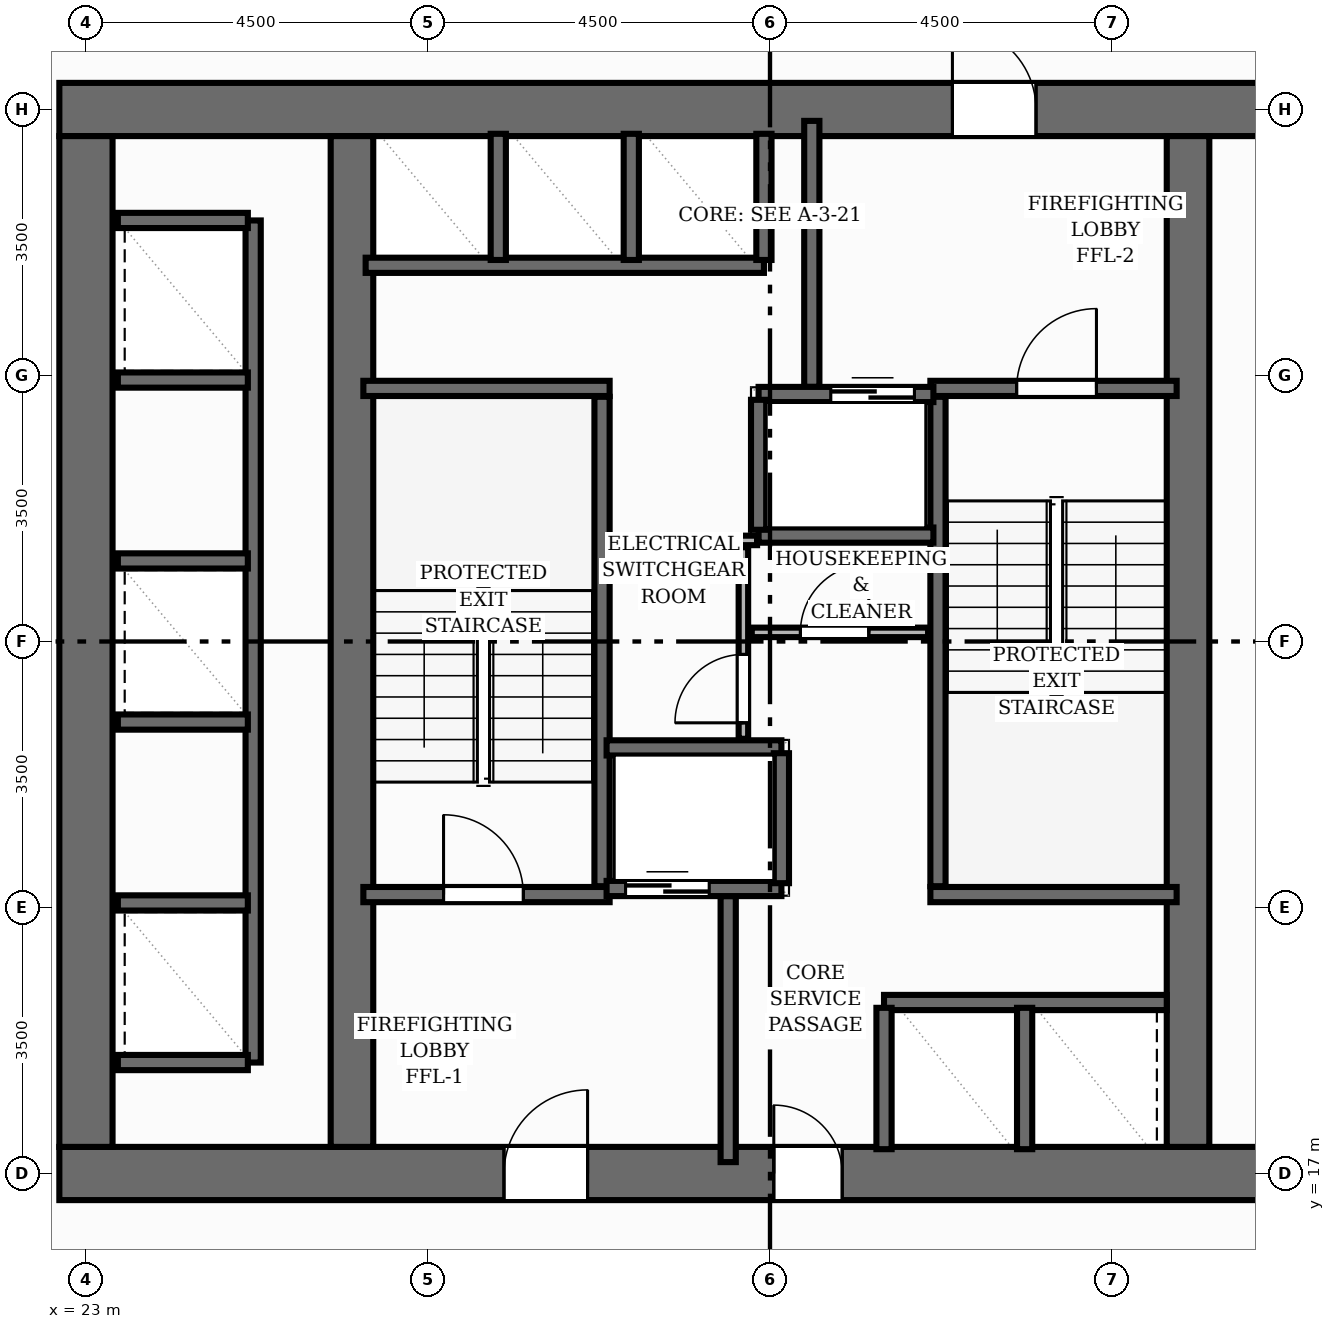
"""IFC4 building model, lengths in metres.
Left out: names, types, materials, properties, quantities, classifications, styles, units other than length and angle.
Written with IfcOpenShell. Run it as: python <this file> out.ifc"""

import sys

from ifc_helpers import new_model, si_unit, direction, frame, frame_2d, origin, place, context, subcontext, project, spatial, rectangle, extrude, element, fill, save


model = new_model("IFC4")
c1 = context("Model", 3, precision=1e-05, world=origin(), true_north=direction((0.0, 1.0)))
c2 = subcontext(c1, "Body", "Model", "MODEL_VIEW")
j1 = project(units=[si_unit("LENGTHUNIT", "METRE"), si_unit("PLANEANGLEUNIT", "RADIAN")], contexts=[c1])
p1 = place(None, origin())
s1 = spatial("IfcSite", under=j1, at=p1, CompositionType="ELEMENT")
p2 = place(p1, origin())
s2 = spatial("IfcBuilding", under=s1, at=p2, CompositionType="ELEMENT")
p3 = place(p2, frame((0.0, 0.0, 80.48)))
s3 = spatial("IfcBuildingStorey", under=s2, at=p3, CompositionType="ELEMENT", Elevation=80.48)
p4 = place(p3, frame((22.65, 17.0, 0.0), z_axis=(0.0, 0.0, 1.0), x_axis=(1.0, 0.0, 0.0)))
e1 = element("IfcWall", 1, at=p4, inside=s3, PredefinedType="SHEAR", context=c2, shape_type="SweptSolid", body=[
    extrude(rectangle(XDim=18.7, YDim=0.7, at=frame_2d((9.35, 0.0))), origin(), (0.0, 0.0, 1.0), 3.2),
])
p5 = place(p4, frame((5.85, 0.0, 0.0)))
e2 = element("IfcOpeningElement", 2, at=p5, cuts=e1, PredefinedType="OPENING", context=c2, shape_type="SweptSolid", body=[
    extrude(rectangle(XDim=1.1, YDim=2.15, at=frame_2d((0.55, 1.075))), frame((0.0, 0.36, 0.0), z_axis=(0.0, -1.0, 0.0), x_axis=(1.0, 0.0, 0.0)), (0.0, 0.0, 1.0), 0.72),
])
p6 = place(p4, frame((9.4, 0.0, 0.0)))
e3 = element("IfcOpeningElement", 3, at=p6, cuts=e1, PredefinedType="OPENING", context=c2, shape_type="SweptSolid", body=[
    extrude(rectangle(XDim=0.9, YDim=2.1, at=frame_2d((0.45, 1.05))), frame((0.0, 0.36, 0.0), z_axis=(0.0, -1.0, 0.0), x_axis=(1.0, 0.0, 0.0)), (0.0, 0.0, 1.0), 0.72),
])
p7 = place(p3, frame((22.65, 31.0, 0.0), z_axis=(0.0, 0.0, 1.0), x_axis=(1.0, 0.0, 0.0)))
e4 = element("IfcWall", 4, at=p7, inside=s3, PredefinedType="SHEAR", context=c2, shape_type="SweptSolid", body=[
    extrude(rectangle(XDim=18.7, YDim=0.7, at=frame_2d((9.35, 0.0))), origin(), (0.0, 0.0, 1.0), 3.2),
])
p8 = place(p7, frame((11.75, 0.0, 0.0)))
e5 = element("IfcOpeningElement", 5, at=p8, cuts=e4, PredefinedType="OPENING", context=c2, shape_type="SweptSolid", body=[
    extrude(rectangle(XDim=1.1, YDim=2.15, at=frame_2d((0.55, 1.075))), frame((0.0, 0.36, 0.0), z_axis=(0.0, -1.0, 0.0), x_axis=(1.0, 0.0, 0.0)), (0.0, 0.0, 1.0), 0.72),
])
p9 = place(p3, frame((23.0, 17.35, 0.0), z_axis=(0.0, 0.0, 1.0), x_axis=(0.0, 1.0, 0.0)))
e6 = element("IfcWall", 6, at=p9, inside=s3, PredefinedType="SHEAR", context=c2, shape_type="SweptSolid", body=[
    extrude(rectangle(XDim=13.3, YDim=0.7, at=frame_2d((6.65, 0.0))), origin(), (0.0, 0.0, 1.0), 3.2),
])
for number, where, z_axis, x_axis in (
    (7, (26.5, 17.35, 0.0), (0.0, 0.0, 1.0), (0.0, 1.0, 0.0)),
    (8, (37.5, 17.35, 0.0), (0.0, 0.0, 1.0), (0.0, 1.0, 0.0)),
):
    element("IfcWall", number, at=place(p3, frame(where, z_axis=z_axis, x_axis=x_axis)), inside=s3, PredefinedType="SHEAR", context=c2, shape_type="SweptSolid", body=[
        extrude(rectangle(XDim=13.3, YDim=0.56, at=frame_2d((6.65, 0.0))), origin(), (0.0, 0.0, 1.0), 3.2),
    ])
p10 = place(p3, frame((29.79, 20.78, 0.0), z_axis=(0.0, 0.0, 1.0), x_axis=(0.0, 1.0, 0.0)))
e9 = element("IfcWall", 9, at=p10, inside=s3, PredefinedType="SHEAR", context=c2, shape_type="SweptSolid", body=[
    extrude(rectangle(XDim=6.44, YDim=0.2, at=frame_2d((3.22, 0.0))), origin(), (0.0, 0.0, 1.0), 3.2),
])
p11 = place(p3, frame((26.65, 27.33, 0.0), z_axis=(0.0, 0.0, 1.0), x_axis=(1.0, 0.0, 0.0)))
e10 = element("IfcWall", 10, at=p11, inside=s3, PredefinedType="SHEAR", context=c2, shape_type="SweptSolid", body=[
    extrude(rectangle(XDim=3.24, YDim=0.2, at=frame_2d((1.62, 0.0))), origin(), (0.0, 0.0, 1.0), 3.2),
])
p12 = place(p3, frame((26.65, 20.67, 0.0), z_axis=(0.0, 0.0, 1.0), x_axis=(1.0, 0.0, 0.0)))
e11 = element("IfcWall", 11, at=p12, inside=s3, PredefinedType="SHEAR", context=c2, shape_type="SweptSolid", body=[
    extrude(rectangle(XDim=3.24, YDim=0.2, at=frame_2d((1.62, 0.0))), origin(), (0.0, 0.0, 1.0), 3.2),
])
p13 = place(p12, frame((1.055, 0.0, 0.0)))
e12 = element("IfcOpeningElement", 12, at=p13, cuts=e11, PredefinedType="OPENING", context=c2, shape_type="SweptSolid", body=[
    extrude(rectangle(XDim=1.05, YDim=2.15, at=frame_2d((0.525, 1.075))), frame((0.0, 0.11, 0.0), z_axis=(0.0, -1.0, 0.0), x_axis=(1.0, 0.0, 0.0)), (0.0, 0.0, 1.0), 0.22),
])
p14 = place(p3, frame((34.21, 20.78, 0.0), z_axis=(0.0, 0.0, 1.0), x_axis=(0.0, 1.0, 0.0)))
e13 = element("IfcWall", 13, at=p14, inside=s3, PredefinedType="SHEAR", context=c2, shape_type="SweptSolid", body=[
    extrude(rectangle(XDim=6.44, YDim=0.2, at=frame_2d((3.22, 0.0))), origin(), (0.0, 0.0, 1.0), 3.2),
])
p15 = place(p3, frame((34.11, 20.67, 0.0), z_axis=(0.0, 0.0, 1.0), x_axis=(1.0, 0.0, 0.0)))
e14 = element("IfcWall", 14, at=p15, inside=s3, PredefinedType="SHEAR", context=c2, shape_type="SweptSolid", body=[
    extrude(rectangle(XDim=3.24, YDim=0.2, at=frame_2d((1.62, 0.0))), origin(), (0.0, 0.0, 1.0), 3.2),
])
p16 = place(p3, frame((34.11, 27.33, 0.0), z_axis=(0.0, 0.0, 1.0), x_axis=(1.0, 0.0, 0.0)))
e15 = element("IfcWall", 15, at=p16, inside=s3, PredefinedType="SHEAR", context=c2, shape_type="SweptSolid", body=[
    extrude(rectangle(XDim=3.24, YDim=0.2, at=frame_2d((1.62, 0.0))), origin(), (0.0, 0.0, 1.0), 3.2),
])
p17 = place(p16, frame((1.135, 0.0, 0.0)))
e16 = element("IfcOpeningElement", 16, at=p17, cuts=e15, PredefinedType="OPENING", context=c2, shape_type="SweptSolid", body=[
    extrude(rectangle(XDim=1.05, YDim=2.15, at=frame_2d((0.525, 1.075))), frame((0.0, 0.11, 0.0), z_axis=(0.0, -1.0, 0.0), x_axis=(1.0, 0.0, 0.0)), (0.0, 0.0, 1.0), 0.22),
])
for number, where, z_axis, x_axis in (
    (17, (31.45, 17.15, 0.0), (0.0, 0.0, 1.0), (0.0, 1.0, 0.0)),
    (18, (32.55, 27.35, 0.0), (0.0, 0.0, 1.0), (0.0, 1.0, 0.0)),
):
    element("IfcWall", number, at=place(p3, frame(where, z_axis=z_axis, x_axis=x_axis)), inside=s3, PredefinedType="SHEAR", context=c2, shape_type="SweptSolid", body=[
        extrude(rectangle(XDim=3.5, YDim=0.2, at=frame_2d((1.75, 0.0))), origin(), (0.0, 0.0, 1.0), 3.2),
    ])
p18 = place(p3, frame((29.85, 20.75, 0.0), z_axis=(0.0, 0.0, 1.0), x_axis=(1.0, 0.0, 0.0)))
e19 = element("IfcWall", 19, at=p18, inside=s3, PredefinedType="SHEAR", context=c2, shape_type="SweptSolid", body=[
    extrude(rectangle(XDim=2.3, YDim=0.2, at=frame_2d((1.15, 0.0))), origin(), (0.0, 0.0, 1.0), 3.2),
])
p19 = place(p18, frame((0.25, 0.0, 0.0)))
e20 = element("IfcOpeningElement", 20, at=p19, cuts=e19, PredefinedType="OPENING", context=c2, shape_type="SweptSolid", body=[
    extrude(rectangle(XDim=1.1, YDim=2.15, at=frame_2d((0.55, 1.075))), frame((0.0, 0.11, 0.0), z_axis=(0.0, -1.0, 0.0), x_axis=(1.0, 0.0, 0.0)), (0.0, 0.0, 1.0), 0.22),
])
p20 = place(p3, frame((29.85, 22.6, 0.0), z_axis=(0.0, 0.0, 1.0), x_axis=(1.0, 0.0, 0.0)))
e21 = element("IfcWall", 21, at=p20, inside=s3, PredefinedType="SHEAR", context=c2, shape_type="SweptSolid", body=[
    extrude(rectangle(XDim=2.3, YDim=0.2, at=frame_2d((1.15, 0.0))), origin(), (0.0, 0.0, 1.0), 3.2),
])
p21 = place(p3, frame((32.15, 20.82, 0.0), z_axis=(0.0, 0.0, 1.0), x_axis=(0.0, 1.0, 0.0)))
e22 = element("IfcWall", 22, at=p21, inside=s3, PredefinedType="SHEAR", context=c2, shape_type="SweptSolid", body=[
    extrude(rectangle(XDim=1.71, YDim=0.2, at=frame_2d((0.855, 0.0))), origin(), (0.0, 0.0, 1.0), 3.2),
])
p22 = place(p3, frame((31.85, 27.25, 0.0), z_axis=(0.0, 0.0, 1.0), x_axis=(1.0, 0.0, 0.0)))
e23 = element("IfcWall", 23, at=p22, inside=s3, PredefinedType="SHEAR", context=c2, shape_type="SweptSolid", body=[
    extrude(rectangle(XDim=2.3, YDim=0.2, at=frame_2d((1.15, 0.0))), origin(), (0.0, 0.0, 1.0), 3.2),
])
p23 = place(p22, frame((0.95, 0.0, 0.0)))
e24 = element("IfcOpeningElement", 24, at=p23, cuts=e23, PredefinedType="OPENING", context=c2, shape_type="SweptSolid", body=[
    extrude(rectangle(XDim=1.1, YDim=2.15, at=frame_2d((0.55, 1.075))), frame((0.0, 0.11, 0.0), z_axis=(0.0, -1.0, 0.0), x_axis=(1.0, 0.0, 0.0)), (0.0, 0.0, 1.0), 0.22),
])
p24 = place(p3, frame((31.85, 25.4, 0.0), z_axis=(0.0, 0.0, 1.0), x_axis=(1.0, 0.0, 0.0)))
e25 = element("IfcWall", 25, at=p24, inside=s3, PredefinedType="SHEAR", context=c2, shape_type="SweptSolid", body=[
    extrude(rectangle(XDim=2.3, YDim=0.2, at=frame_2d((1.15, 0.0))), origin(), (0.0, 0.0, 1.0), 3.2),
])
p25 = place(p3, frame((31.85, 25.47, 0.0), z_axis=(0.0, 0.0, 1.0), x_axis=(0.0, 1.0, 0.0)))
e26 = element("IfcWall", 26, at=p25, inside=s3, PredefinedType="SHEAR", context=c2, shape_type="SweptSolid", body=[
    extrude(rectangle(XDim=1.71, YDim=0.2, at=frame_2d((0.855, 0.0))), origin(), (0.0, 0.0, 1.0), 3.2),
])
p26 = place(p3, frame((25.2, 18.46, 0.0), z_axis=(0.0, 0.0, 1.0), x_axis=(0.0, 1.0, 0.0)))
e27 = element("IfcWall", 27, at=p26, inside=s3, PredefinedType="SHEAR", context=c2, shape_type="SweptSolid", body=[
    extrude(rectangle(XDim=11.08, YDim=0.2, at=frame_2d((5.54, 0.0))), origin(), (0.0, 0.0, 1.0), 3.2),
])
for number, where, z_axis, x_axis in (
    (28, (23.42, 18.46, 0.0), (0.0, 0.0, 1.0), (1.0, 0.0, 0.0)),
    (29, (23.42, 29.54, 0.0), (0.0, 0.0, 1.0), (1.0, 0.0, 0.0)),
    (30, (23.42, 20.56, 0.0), (0.0, 0.0, 1.0), (1.0, 0.0, 0.0)),
    (31, (23.42, 22.94, 0.0), (0.0, 0.0, 1.0), (1.0, 0.0, 0.0)),
    (32, (23.42, 25.06, 0.0), (0.0, 0.0, 1.0), (1.0, 0.0, 0.0)),
    (33, (23.42, 27.44, 0.0), (0.0, 0.0, 1.0), (1.0, 0.0, 0.0)),
):
    element("IfcWall", number, at=place(p3, frame(where, z_axis=z_axis, x_axis=x_axis)), inside=s3, PredefinedType="SHEAR", context=c2, shape_type="SweptSolid", body=[
        extrude(rectangle(XDim=1.71, YDim=0.2, at=frame_2d((0.855, 0.0))), origin(), (0.0, 0.0, 1.0), 3.2),
    ])
p27 = place(p3, frame((26.68, 28.95, 0.0), z_axis=(0.0, 0.0, 1.0), x_axis=(1.0, 0.0, 0.0)))
e34 = element("IfcWall", 34, at=p27, inside=s3, PredefinedType="SHEAR", context=c2, shape_type="SweptSolid", body=[
    extrude(rectangle(XDim=5.24, YDim=0.2, at=frame_2d((2.62, 0.0))), origin(), (0.0, 0.0, 1.0), 3.2),
])
for number, where, z_axis, x_axis in (
    (35, (31.92, 29.02, 0.0), (0.0, 0.0, 1.0), (0.0, 1.0, 0.0)),
    (36, (28.425, 29.02, 0.0), (0.0, 0.0, 1.0), (0.0, 1.0, 0.0)),
    (37, (30.175, 29.02, 0.0), (0.0, 0.0, 1.0), (0.0, 1.0, 0.0)),
):
    element("IfcWall", number, at=place(p3, frame(where, z_axis=z_axis, x_axis=x_axis)), inside=s3, PredefinedType="SHEAR", context=c2, shape_type="SweptSolid", body=[
        extrude(rectangle(XDim=1.66, YDim=0.2, at=frame_2d((0.83, 0.0))), origin(), (0.0, 0.0, 1.0), 3.2),
    ])
p28 = place(p3, frame((33.5, 19.25, 0.0), z_axis=(0.0, 0.0, 1.0), x_axis=(1.0, 0.0, 0.0)))
e38 = element("IfcWall", 38, at=p28, inside=s3, PredefinedType="SHEAR", context=c2, shape_type="SweptSolid", body=[
    extrude(rectangle(XDim=3.72, YDim=0.2, at=frame_2d((1.86, 0.0))), origin(), (0.0, 0.0, 1.0), 3.2),
])
for number, where, z_axis, x_axis in (
    (39, (33.5, 17.32, 0.0), (0.0, 0.0, 1.0), (0.0, 1.0, 0.0)),
    (40, (35.35, 17.32, 0.0), (0.0, 0.0, 1.0), (0.0, 1.0, 0.0)),
):
    element("IfcWall", number, at=place(p3, frame(where, z_axis=z_axis, x_axis=x_axis)), inside=s3, PredefinedType="SHEAR", context=c2, shape_type="SweptSolid", body=[
        extrude(rectangle(XDim=1.86, YDim=0.2, at=frame_2d((0.93, 0.0))), origin(), (0.0, 0.0, 1.0), 3.2),
    ])
p29 = place(p3, frame((31.65, 22.72, 0.0), z_axis=(0.0, 0.0, 1.0), x_axis=(0.0, 1.0, 0.0)))
e41 = element("IfcWall", 41, at=p29, inside=s3, PredefinedType="PARTITIONING", context=c2, shape_type="SweptSolid", body=[
    extrude(rectangle(XDim=2.52, YDim=0.125, at=frame_2d((1.26, 0.0))), origin(), (0.0, 0.0, 1.0), 2.955),
])
p30 = place(p29, frame((0.21, 0.0, 0.0)))
e42 = element("IfcOpeningElement", 42, at=p30, cuts=e41, PredefinedType="OPENING", context=c2, shape_type="SweptSolid", body=[
    extrude(rectangle(XDim=0.9, YDim=2.1, at=frame_2d((0.45, 1.05))), frame((0.0, 0.073, 0.0), z_axis=(0.0, -1.0, 0.0), x_axis=(1.0, 0.0, 0.0)), (0.0, 0.0, 1.0), 0.145),
])
p31 = place(p3, frame((31.76, 24.12, 0.0), z_axis=(0.0, 0.0, 1.0), x_axis=(1.0, 0.0, 0.0)))
e43 = element("IfcWall", 43, at=p31, inside=s3, PredefinedType="PARTITIONING", context=c2, shape_type="SweptSolid", body=[
    extrude(rectangle(XDim=2.32, YDim=0.125, at=frame_2d((1.16, 0.0))), origin(), (0.0, 0.0, 1.0), 2.955),
])
p32 = place(p31, frame((0.64, 0.0, 0.0)))
e44 = element("IfcOpeningElement", 44, at=p32, cuts=e43, PredefinedType="OPENING", context=c2, shape_type="SweptSolid", body=[
    extrude(rectangle(XDim=0.9, YDim=2.1, at=frame_2d((0.45, 1.05))), frame((0.0, 0.073, 0.0), z_axis=(0.0, -1.0, 0.0), x_axis=(1.0, 0.0, 0.0)), (0.0, 0.0, 1.0), 0.145),
])
p33 = place(p3, frame((29.89, 25.33, 0.0), z_axis=(0.0, 0.0, 1.0), x_axis=(1.0, 0.0, 0.0)))
e45 = element("IfcWall", 45, at=p33, inside=s3, PredefinedType="PARTITIONING", context=c2, shape_type="SweptSolid", body=[
    extrude(rectangle(XDim=1.94, YDim=0.125, at=frame_2d((0.97, 0.0))), origin(), (0.0, 0.0, 1.0), 2.955),
])
p34 = place(p13, origin())
e46 = element("IfcDoor", 46, at=p34, inside=s3, OperationType="SINGLE_SWING_LEFT", PredefinedType="DOOR", context=c2, shape_type="SweptSolid", body=[
    extrude(rectangle(XDim=1.05, YDim=2.15, at=frame_2d((0.525, 1.075))), frame((0.0, 0.025, 0.0), z_axis=(0.0, -1.0, 0.0), x_axis=(1.0, 0.0, 0.0)), (0.0, 0.0, 1.0), 0.05),
])
fill(e12, e46)
p35 = place(p17, origin())
e47 = element("IfcDoor", 47, at=p35, inside=s3, OperationType="SINGLE_SWING_RIGHT", PredefinedType="DOOR", context=c2, shape_type="SweptSolid", body=[
    extrude(rectangle(XDim=1.05, YDim=2.15, at=frame_2d((0.525, 1.075))), frame((0.0, 0.025, 0.0), z_axis=(0.0, -1.0, 0.0), x_axis=(1.0, 0.0, 0.0)), (0.0, 0.0, 1.0), 0.05),
])
fill(e16, e47)
p36 = place(p5, origin())
e48 = element("IfcDoor", 48, at=p36, inside=s3, OperationType="SINGLE_SWING_RIGHT", PredefinedType="DOOR", context=c2, shape_type="SweptSolid", body=[
    extrude(rectangle(XDim=1.1, YDim=2.15, at=frame_2d((0.55, 1.075))), frame((0.0, 0.025, 0.0), z_axis=(0.0, -1.0, 0.0), x_axis=(1.0, 0.0, 0.0)), (0.0, 0.0, 1.0), 0.05),
])
fill(e2, e48)
p37 = place(p8, origin())
e49 = element("IfcDoor", 49, at=p37, inside=s3, OperationType="SINGLE_SWING_LEFT", PredefinedType="DOOR", context=c2, shape_type="SweptSolid", body=[
    extrude(rectangle(XDim=1.1, YDim=2.15, at=frame_2d((0.55, 1.075))), frame((0.0, 0.025, 0.0), z_axis=(0.0, -1.0, 0.0), x_axis=(1.0, 0.0, 0.0)), (0.0, 0.0, 1.0), 0.05),
])
fill(e5, e49)
p38 = place(p19, origin())
e50 = element("IfcDoor", 50, at=p38, inside=s3, OperationType="DOUBLE_DOOR_SLIDING", PredefinedType="DOOR", context=c2, shape_type="SweptSolid", body=[
    extrude(rectangle(XDim=1.1, YDim=2.15, at=frame_2d((0.55, 1.075))), frame((0.0, 0.025, 0.0), z_axis=(0.0, -1.0, 0.0), x_axis=(1.0, 0.0, 0.0)), (0.0, 0.0, 1.0), 0.05),
])
fill(e20, e50)
p39 = place(p23, origin())
e51 = element("IfcDoor", 51, at=p39, inside=s3, OperationType="DOUBLE_DOOR_SLIDING", PredefinedType="DOOR", context=c2, shape_type="SweptSolid", body=[
    extrude(rectangle(XDim=1.1, YDim=2.15, at=frame_2d((0.55, 1.075))), frame((0.0, 0.025, 0.0), z_axis=(0.0, -1.0, 0.0), x_axis=(1.0, 0.0, 0.0)), (0.0, 0.0, 1.0), 0.05),
])
fill(e24, e51)
p40 = place(p6, origin())
e52 = element("IfcDoor", 52, at=p40, inside=s3, OperationType="SINGLE_SWING_LEFT", PredefinedType="DOOR", context=c2, shape_type="SweptSolid", body=[
    extrude(rectangle(XDim=0.9, YDim=2.1, at=frame_2d((0.45, 1.05))), frame((0.0, 0.025, 0.0), z_axis=(0.0, -1.0, 0.0), x_axis=(1.0, 0.0, 0.0)), (0.0, 0.0, 1.0), 0.05),
])
fill(e3, e52)
p41 = place(p30, origin())
e53 = element("IfcDoor", 53, at=p41, inside=s3, OperationType="SINGLE_SWING_LEFT", PredefinedType="DOOR", context=c2, shape_type="SweptSolid", body=[
    extrude(rectangle(XDim=0.9, YDim=2.1, at=frame_2d((0.45, 1.05))), frame((0.0, 0.025, 0.0), z_axis=(0.0, -1.0, 0.0), x_axis=(1.0, 0.0, 0.0)), (0.0, 0.0, 1.0), 0.05),
])
fill(e42, e53)
p42 = place(p32, origin())
e54 = element("IfcDoor", 54, at=p42, inside=s3, OperationType="SINGLE_SWING_RIGHT", PredefinedType="DOOR", context=c2, shape_type="SweptSolid", body=[
    extrude(rectangle(XDim=0.9, YDim=2.1, at=frame_2d((0.45, 1.05))), frame((0.0, 0.025, 0.0), z_axis=(0.0, -1.0, 0.0), x_axis=(1.0, 0.0, 0.0)), (0.0, 0.0, 1.0), 0.05),
])
fill(e44, e54)
save(model, sys.argv[1])
